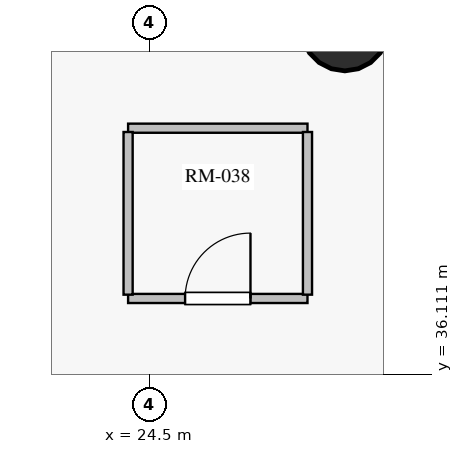
"""IFC4 building model, lengths in metres.
Left out: names, types, materials, properties, quantities, classifications, styles, units other than length and angle.
Written with IfcOpenShell. Run it as: python <this file> out.ifc"""

import sys

from ifc_helpers import new_model, si_unit, direction, frame, frame_2d, origin, origin_with_axes, origin_2d, place, context, subcontext, project, spatial, rectangle, circle, extrude, source, transform, mapped, element, fill, save


model = new_model("IFC4")
c1 = context("Model", 3, precision=1e-05, world=origin(), true_north=direction((0.0, 1.0)))
c2 = subcontext(c1, "Body", "Model", "MODEL_VIEW")
j1 = project(units=[si_unit("LENGTHUNIT", "METRE"), si_unit("PLANEANGLEUNIT", "RADIAN")], contexts=[c1])
p1 = place(None, origin())
s1 = spatial("IfcSite", under=j1, at=p1, CompositionType="ELEMENT")
p2 = place(p1, origin())
s2 = spatial("IfcBuilding", under=s1, at=p2, CompositionType="ELEMENT")
p3 = place(p2, frame((0.0, 0.0, 244.35)))
s3 = spatial("IfcBuildingStorey", under=s2, at=p3, CompositionType="ELEMENT", Elevation=244.35)
m1 = source(origin_with_axes(), c2, "Body", "SweptSolid", [
    extrude(circle(Radius=0.575, at=origin_2d()), origin(), (0.0, 0.0, 1.0), 3.05),
])
p4 = place(p3, frame((27.073, 40.677, 0.0), z_axis=(0.0, 0.0, 1.0), x_axis=(1.0, 0.0, 0.0)))
e1 = element("IfcColumn", 1, at=p4, inside=s3, PredefinedType="COLUMN", context=c2, shape_type="MappedRepresentation", body=[
    mapped(m1, transform((0.0, 0.0, 0.0), scale=1.0)),
])
p5 = place(p3, frame((24.221, 37.108, 0.0), z_axis=(0.0, 0.0, 1.0), x_axis=(1.0, 0.0, 0.0)))
e2 = element("IfcWall", 2, at=p5, inside=s3, PredefinedType="PARTITIONING", context=c2, shape_type="SweptSolid", body=[
    extrude(rectangle(XDim=2.36, YDim=0.12, at=frame_2d((1.18, 0.0))), origin(), (0.0, 0.0, 1.0), 2.45),
])
p6 = place(p5, frame((0.75, 0.0, 0.0)))
e3 = element("IfcOpeningElement", 3, at=p6, cuts=e2, PredefinedType="OPENING", context=c2, shape_type="SweptSolid", body=[
    extrude(rectangle(XDim=0.86, YDim=2.1, at=frame_2d((0.43, 1.05))), frame((0.0, 0.07, 0.0), z_axis=(0.0, -1.0, 0.0), x_axis=(1.0, 0.0, 0.0)), (0.0, 0.0, 1.0), 0.14),
])
p7 = place(p3, frame((26.581, 39.348, 0.0), z_axis=(0.0, 0.0, 1.0), x_axis=(-1.0, 0.0, 0.0)))
e4 = element("IfcWall", 4, at=p7, inside=s3, PredefinedType="PARTITIONING", context=c2, shape_type="SweptSolid", body=[
    extrude(rectangle(XDim=2.36, YDim=0.12, at=frame_2d((1.18, 0.0))), origin(), (0.0, 0.0, 1.0), 2.3),
])
p8 = place(p3, frame((26.581, 37.158, 0.0), z_axis=(0.0, 0.0, 1.0), x_axis=(0.0, 1.0, 0.0)))
e5 = element("IfcWall", 5, at=p8, inside=s3, PredefinedType="PARTITIONING", context=c2, shape_type="SweptSolid", body=[
    extrude(rectangle(XDim=2.14, YDim=0.12, at=frame_2d((1.07, 0.0))), origin(), (0.0, 0.0, 1.0), 2.35),
])
p9 = place(p3, frame((24.221, 39.298, 0.0), z_axis=(0.0, 0.0, 1.0), x_axis=(0.0, -1.0, 0.0)))
e6 = element("IfcWall", 6, at=p9, inside=s3, PredefinedType="PARTITIONING", context=c2, shape_type="SweptSolid", body=[
    extrude(rectangle(XDim=2.14, YDim=0.12, at=frame_2d((1.07, 0.0))), origin(), (0.0, 0.0, 1.0), 2.85),
])
m2 = source(origin_with_axes(), c2, "Body", "SweptSolid", [
    extrude(rectangle(XDim=0.86, YDim=2.1, at=frame_2d((0.43, 1.05))), frame((0.0, 0.025, 0.0), z_axis=(0.0, -1.0, 0.0), x_axis=(1.0, 0.0, 0.0)), (0.0, 0.0, 1.0), 0.05),
])
p10 = place(p6, origin())
e7 = element("IfcDoor", 7, at=p10, inside=s3, OperationType="SINGLE_SWING_RIGHT", PredefinedType="DOOR", context=c2, shape_type="MappedRepresentation", body=[
    mapped(m2, transform((0.0, 0.0, 0.0), scale=1.0)),
])
fill(e3, e7)
save(model, sys.argv[1])
